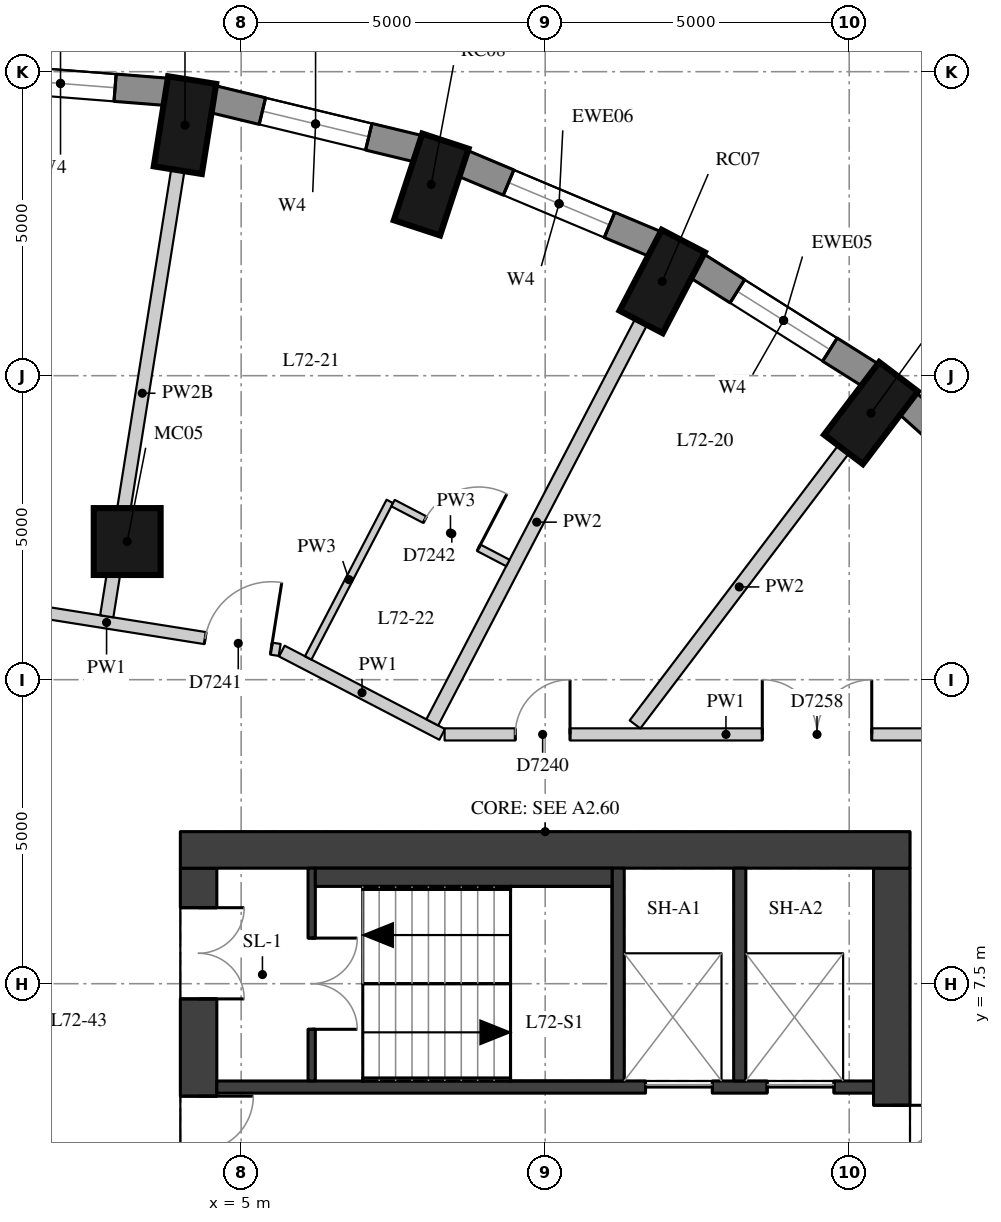
"""IFC4 building model, lengths in metres.
Left out: names, types, materials, properties, quantities, classifications, styles, units other than length and angle.
Written with IfcOpenShell. Run it as: python <this file> out.ifc"""

import sys

from ifc_helpers import new_model, si_unit, direction, frame, frame_2d, origin, origin_2d, place, context, subcontext, project, spatial, rectangle, extrude, element, fill, save


model = new_model("IFC4")
c1 = context("Model", 3, precision=1e-05, world=origin(), true_north=direction((0.0, 1.0)))
c2 = subcontext(c1, "Body", "Model", "MODEL_VIEW")
j1 = project(units=[si_unit("LENGTHUNIT", "METRE"), si_unit("PLANEANGLEUNIT", "RADIAN")], contexts=[c1])
p1 = place(None, origin())
s1 = spatial("IfcSite", under=j1, at=p1, CompositionType="ELEMENT")
p2 = place(p1, origin())
s2 = spatial("IfcBuilding", under=s1, at=p2, CompositionType="ELEMENT")
p3 = place(p2, frame((0.0, 0.0, 253.1)))
s3 = spatial("IfcBuildingStorey", under=s2, at=p3, CompositionType="ELEMENT", Elevation=253.1)
for number, where, z_axis, x_axis in (
    (1, (15.359, 16.885, 0.0), (0.0, 0.0, 1.0), (0.604, 0.797, 0.0)),
    (2, (11.925, 19.05, 0.0), (0.0, 0.0, 1.0), (0.462, 0.887, 0.0)),
    (3, (8.125, 20.644, 0.0), (0.0, 0.0, 1.0), (0.312, 0.95, 0.0)),
    (4, (4.076, 21.621, 0.0), (0.0, 0.0, 1.0), (0.157, 0.988, 0.0)),
):
    element("IfcColumn", number, at=place(p3, frame(where, z_axis=z_axis, x_axis=x_axis)), inside=s3, PredefinedType="COLUMN", context=c2, shape_type="SweptSolid", body=[
        extrude(rectangle(XDim=1.5, YDim=0.8, at=origin_2d()), origin(), (0.0, 0.0, 1.0), 3.3),
    ])
p4 = place(p3, frame((3.126, 14.772, 0.0), z_axis=(0.0, 0.0, 1.0), x_axis=(1.0, 0.0, 0.0)))
e5 = element("IfcColumn", 5, at=p4, inside=s3, PredefinedType="COLUMN", context=c2, shape_type="SweptSolid", body=[
    extrude(rectangle(XDim=1.1, YDim=1.1, at=origin_2d()), origin(), (0.0, 0.0, 1.0), 3.3),
])
p5 = place(p3, frame((18.424, 14.828, 0.0), z_axis=(0.0, 0.0, 1.0), x_axis=(-0.743166014219, 0.669107073128, 0.0)))
e6 = element("IfcWall", 6, at=p5, inside=s3, PredefinedType="SOLIDWALL", context=c2, shape_type="SweptSolid", body=[
    extrude(rectangle(XDim=3.316, YDim=0.45, at=frame_2d((1.658, 0.0))), origin(), (0.0, 0.0, 1.0), 3.02),
])
p6 = place(p3, frame((15.353, 17.506, 0.0), z_axis=(0.0, 0.0, 1.0), x_axis=(-0.845929139811, 0.53329531258, 0.0)))
e7 = element("IfcWall", 7, at=p6, inside=s3, PredefinedType="SOLIDWALL", context=c2, shape_type="SweptSolid", body=[
    extrude(rectangle(XDim=3.385, YDim=0.45, at=frame_2d((1.692, 0.0))), origin(), (0.0, 0.0, 1.0), 3.02),
])
p7 = place(p6, frame((0.792, 0.0, 0.4)))
e8 = element("IfcOpeningElement", 8, at=p7, cuts=e7, PredefinedType="OPENING", context=c2, shape_type="SweptSolid", body=[
    extrude(rectangle(XDim=1.8, YDim=1.75, at=frame_2d((0.9, 0.875))), frame((0.0, 0.235, 0.0), z_axis=(0.0, -1.0, 0.0), x_axis=(1.0, 0.0, 0.0)), (0.0, 0.0, 1.0), 0.47),
])
p8 = place(p3, frame((11.816, 19.662, 0.0), z_axis=(0.0, 0.0, 1.0), x_axis=(-0.922024627475, 0.387131226239, 0.0)))
e9 = element("IfcWall", 9, at=p8, inside=s3, PredefinedType="SOLIDWALL", context=c2, shape_type="SweptSolid", body=[
    extrude(rectangle(XDim=3.443, YDim=0.45, at=frame_2d((1.722, 0.0))), origin(), (0.0, 0.0, 1.0), 3.02),
])
p9 = place(p8, frame((0.822, 0.0, 0.4)))
e10 = element("IfcOpeningElement", 10, at=p9, cuts=e9, PredefinedType="OPENING", context=c2, shape_type="SweptSolid", body=[
    extrude(rectangle(XDim=1.8, YDim=1.75, at=frame_2d((0.9, 0.875))), frame((0.0, 0.235, 0.0), z_axis=(0.0, -1.0, 0.0), x_axis=(1.0, 0.0, 0.0)), (0.0, 0.0, 1.0), 0.47),
])
p10 = place(p3, frame((7.919, 21.232, 0.0), z_axis=(0.0, 0.0, 1.0), x_axis=(-0.972099278496, 0.23456980357, 0.0)))
e11 = element("IfcWall", 11, at=p10, inside=s3, PredefinedType="SOLIDWALL", context=c2, shape_type="SweptSolid", body=[
    extrude(rectangle(XDim=3.487, YDim=0.45, at=frame_2d((1.743, 0.0))), origin(), (0.0, 0.0, 1.0), 3.02),
])
p11 = place(p10, frame((0.843, 0.0, 0.4)))
e12 = element("IfcOpeningElement", 12, at=p11, cuts=e11, PredefinedType="OPENING", context=c2, shape_type="SweptSolid", body=[
    extrude(rectangle(XDim=1.8, YDim=1.75, at=frame_2d((0.9, 0.875))), frame((0.0, 0.235, 0.0), z_axis=(0.0, -1.0, 0.0), x_axis=(1.0, 0.0, 0.0)), (0.0, 0.0, 1.0), 0.47),
])
p12 = place(p3, frame((3.779, 22.169, 0.0), z_axis=(0.0, 0.0, 1.0), x_axis=(-0.996910775835, 0.078542377245, 0.0)))
e13 = element("IfcWall", 13, at=p12, inside=s3, PredefinedType="SOLIDWALL", context=c2, shape_type="SweptSolid", body=[
    extrude(rectangle(XDim=3.509, YDim=0.45, at=frame_2d((1.755, 0.0))), origin(), (0.0, 0.0, 1.0), 3.02),
])
p13 = place(p12, frame((0.855, 0.0, 0.4)))
e14 = element("IfcOpeningElement", 14, at=p13, cuts=e13, PredefinedType="OPENING", context=c2, shape_type="SweptSolid", body=[
    extrude(rectangle(XDim=1.8, YDim=1.75, at=frame_2d((0.9, 0.875))), frame((0.0, 0.235, 0.0), z_axis=(0.0, -1.0, 0.0), x_axis=(1.0, 0.0, 0.0)), (0.0, 0.0, 1.0), 0.47),
])
p14 = place(p3, frame((4.3, -9.4, 0.0), z_axis=(0.0, 0.0, 1.0), x_axis=(0.0, 1.0, 0.0)))
e15 = element("IfcWall", 15, at=p14, inside=s3, PredefinedType="SHEAR", context=c2, shape_type="SweptSolid", body=[
    extrude(rectangle(XDim=18.8, YDim=0.6, at=frame_2d((9.4, 0.0))), origin(), (0.0, 0.0, 1.0), 3.02),
])
p15 = place(p14, frame((0.65, 0.0, 0.0)))
e16 = element("IfcOpeningElement", 16, at=p15, cuts=e15, PredefinedType="OPENING", context=c2, shape_type="SweptSolid", body=[
    extrude(rectangle(XDim=1.5, YDim=2.1, at=frame_2d((0.75, 1.05))), frame((0.0, 0.31, 0.0), z_axis=(0.0, -1.0, 0.0), x_axis=(1.0, 0.0, 0.0)), (0.0, 0.0, 1.0), 0.62),
])
p16 = place(p14, frame((3.75, 0.0, 0.0)))
e17 = element("IfcOpeningElement", 17, at=p16, cuts=e15, PredefinedType="OPENING", context=c2, shape_type="SweptSolid", body=[
    extrude(rectangle(XDim=1.8, YDim=2.1, at=frame_2d((0.9, 1.05))), frame((0.0, 0.31, 0.0), z_axis=(0.0, -1.0, 0.0), x_axis=(1.0, 0.0, 0.0)), (0.0, 0.0, 1.0), 0.62),
])
p17 = place(p14, frame((6.25, 0.0, 0.0)))
e18 = element("IfcOpeningElement", 18, at=p17, cuts=e15, PredefinedType="OPENING", context=c2, shape_type="SweptSolid", body=[
    extrude(rectangle(XDim=1.1, YDim=2.1, at=frame_2d((0.55, 1.05))), frame((0.0, 0.31, 0.0), z_axis=(0.0, -1.0, 0.0), x_axis=(1.0, 0.0, 0.0)), (0.0, 0.0, 1.0), 0.62),
])
p18 = place(p14, frame((8.9, 0.0, 0.0)))
e19 = element("IfcOpeningElement", 19, at=p18, cuts=e15, PredefinedType="OPENING", context=c2, shape_type="SweptSolid", body=[
    extrude(rectangle(XDim=1.0, YDim=2.1, at=frame_2d((0.5, 1.05))), frame((0.0, 0.31, 0.0), z_axis=(0.0, -1.0, 0.0), x_axis=(1.0, 0.0, 0.0)), (0.0, 0.0, 1.0), 0.62),
])
p19 = place(p14, frame((11.45, 0.0, 0.0)))
e20 = element("IfcOpeningElement", 20, at=p19, cuts=e15, PredefinedType="OPENING", context=c2, shape_type="SweptSolid", body=[
    extrude(rectangle(XDim=1.1, YDim=2.1, at=frame_2d((0.55, 1.05))), frame((0.0, 0.31, 0.0), z_axis=(0.0, -1.0, 0.0), x_axis=(1.0, 0.0, 0.0)), (0.0, 0.0, 1.0), 0.62),
])
p20 = place(p14, frame((13.25, 0.0, 0.0)))
e21 = element("IfcOpeningElement", 21, at=p20, cuts=e15, PredefinedType="OPENING", context=c2, shape_type="SweptSolid", body=[
    extrude(rectangle(XDim=1.8, YDim=2.1, at=frame_2d((0.9, 1.05))), frame((0.0, 0.31, 0.0), z_axis=(0.0, -1.0, 0.0), x_axis=(1.0, 0.0, 0.0)), (0.0, 0.0, 1.0), 0.62),
])
p21 = place(p14, frame((16.65, 0.0, 0.0)))
e22 = element("IfcOpeningElement", 22, at=p21, cuts=e15, PredefinedType="OPENING", context=c2, shape_type="SweptSolid", body=[
    extrude(rectangle(XDim=1.5, YDim=2.1, at=frame_2d((0.75, 1.05))), frame((0.0, 0.31, 0.0), z_axis=(0.0, -1.0, 0.0), x_axis=(1.0, 0.0, 0.0)), (0.0, 0.0, 1.0), 0.62),
])
p22 = place(p3, frame((15.7, -9.4, 0.0), z_axis=(0.0, 0.0, 1.0), x_axis=(0.0, 1.0, 0.0)))
e23 = element("IfcWall", 23, at=p22, inside=s3, PredefinedType="SHEAR", context=c2, shape_type="SweptSolid", body=[
    extrude(rectangle(XDim=18.8, YDim=0.6, at=frame_2d((9.4, 0.0))), origin(), (0.0, 0.0, 1.0), 3.02),
])
p23 = place(p22, frame((13.4, 0.0, 0.0)))
e24 = element("IfcOpeningElement", 24, at=p23, cuts=e23, PredefinedType="OPENING", context=c2, shape_type="SweptSolid", body=[
    extrude(rectangle(XDim=1.5, YDim=2.1, at=frame_2d((0.75, 1.05))), frame((0.0, 0.31, 0.0), z_axis=(0.0, -1.0, 0.0), x_axis=(1.0, 0.0, 0.0)), (0.0, 0.0, 1.0), 0.62),
])
p24 = place(p22, frame((3.9, 0.0, 0.0)))
e25 = element("IfcOpeningElement", 25, at=p24, cuts=e23, PredefinedType="OPENING", context=c2, shape_type="SweptSolid", body=[
    extrude(rectangle(XDim=1.5, YDim=2.1, at=frame_2d((0.75, 1.05))), frame((0.0, 0.31, 0.0), z_axis=(0.0, -1.0, 0.0), x_axis=(1.0, 0.0, 0.0)), (0.0, 0.0, 1.0), 0.62),
])
p25 = place(p3, frame((4.0, 9.7, 0.0), z_axis=(0.0, 0.0, 1.0), x_axis=(1.0, 0.0, 0.0)))
e26 = element("IfcWall", 26, at=p25, inside=s3, PredefinedType="SHEAR", context=c2, shape_type="SweptSolid", body=[
    extrude(rectangle(XDim=12.0, YDim=0.6, at=frame_2d((6.0, 0.0))), origin(), (0.0, 0.0, 1.0), 3.02),
])
p26 = place(p3, frame((4.6, 5.8, 0.0), z_axis=(0.0, 0.0, 1.0), x_axis=(1.0, 0.0, 0.0)))
e27 = element("IfcWall", 27, at=p26, inside=s3, PredefinedType="SHEAR", context=c2, shape_type="SweptSolid", body=[
    extrude(rectangle(XDim=10.8, YDim=0.2, at=frame_2d((5.4, 0.0))), origin(), (0.0, 0.0, 1.0), 3.02),
])
p27 = place(p26, frame((7.05, 0.0, 0.0)))
e28 = element("IfcOpeningElement", 28, at=p27, cuts=e27, PredefinedType="OPENING", context=c2, shape_type="SweptSolid", body=[
    extrude(rectangle(XDim=1.1, YDim=2.1, at=frame_2d((0.55, 1.05))), frame((0.0, 0.11, 0.0), z_axis=(0.0, -1.0, 0.0), x_axis=(1.0, 0.0, 0.0)), (0.0, 0.0, 1.0), 0.22),
])
p28 = place(p26, frame((9.05, 0.0, 0.0)))
e29 = element("IfcOpeningElement", 29, at=p28, cuts=e27, PredefinedType="OPENING", context=c2, shape_type="SweptSolid", body=[
    extrude(rectangle(XDim=1.1, YDim=2.1, at=frame_2d((0.55, 1.05))), frame((0.0, 0.11, 0.0), z_axis=(0.0, -1.0, 0.0), x_axis=(1.0, 0.0, 0.0)), (0.0, 0.0, 1.0), 0.22),
])
for number, where, z_axis, x_axis in (
    (30, (11.2, 5.9, 0.0), (0.0, 0.0, 1.0), (0.0, 1.0, 0.0)),
    (31, (13.2, 5.9, 0.0), (0.0, 0.0, 1.0), (0.0, 1.0, 0.0)),
):
    element("IfcWall", number, at=place(p3, frame(where, z_axis=z_axis, x_axis=x_axis)), inside=s3, PredefinedType="SHEAR", context=c2, shape_type="SweptSolid", body=[
        extrude(rectangle(XDim=3.5, YDim=0.2, at=frame_2d((1.75, 0.0))), origin(), (0.0, 0.0, 1.0), 3.02),
    ])
p29 = place(p3, frame((6.16, 5.9, 0.0), z_axis=(0.0, 0.0, 1.0), x_axis=(0.0, 1.0, 0.0)))
e32 = element("IfcWall", 32, at=p29, inside=s3, PredefinedType="SHEAR", context=c2, shape_type="SweptSolid", body=[
    extrude(rectangle(XDim=3.5, YDim=0.12, at=frame_2d((1.75, 0.0))), origin(), (0.0, 0.0, 1.0), 3.02),
])
p30 = place(p29, frame((0.85, 0.0, 0.0)))
e33 = element("IfcOpeningElement", 33, at=p30, cuts=e32, PredefinedType="OPENING", context=c2, shape_type="SweptSolid", body=[
    extrude(rectangle(XDim=1.5, YDim=2.1, at=frame_2d((0.75, 1.05))), frame((0.0, 0.07, 0.0), z_axis=(0.0, -1.0, 0.0), x_axis=(1.0, 0.0, 0.0)), (0.0, 0.0, 1.0), 0.14),
])
p31 = place(p3, frame((6.22, 9.25, 0.0), z_axis=(0.0, 0.0, 1.0), x_axis=(1.0, 0.0, 0.0)))
e34 = element("IfcWall", 34, at=p31, inside=s3, PredefinedType="PARTITIONING", context=c2, shape_type="SweptSolid", body=[
    extrude(rectangle(XDim=4.88, YDim=0.3, at=frame_2d((2.44, 0.0))), origin(), (0.0, 0.0, 1.0), 3.02),
])
p32 = place(p3, frame((-0.061, 13.894, 0.0), z_axis=(0.0, 0.0, 1.0), x_axis=(0.987623870558, -0.156840971383, 0.0)))
e35 = element("IfcWall", 35, at=p32, inside=s3, PredefinedType="PARTITIONING", context=c2, shape_type="SweptSolid", body=[
    extrude(rectangle(XDim=5.766, YDim=0.2, at=frame_2d((2.883, 0.0))), origin(), (0.0, 0.0, 1.0), 3.02),
])
p33 = place(p32, frame((4.526, 0.0, 0.0)))
e36 = element("IfcOpeningElement", 36, at=p33, cuts=e35, PredefinedType="OPENING", context=c2, shape_type="SweptSolid", body=[
    extrude(rectangle(XDim=1.1, YDim=2.1, at=frame_2d((0.55, 1.05))), frame((0.0, 0.11, 0.0), z_axis=(0.0, -1.0, 0.0), x_axis=(1.0, 0.0, 0.0)), (0.0, 0.0, 1.0), 0.22),
])
p34 = place(p3, frame((5.669, 12.971, 0.0), z_axis=(0.0, 0.0, 1.0), x_axis=(0.887284047921, -0.461223393058, 0.0)))
e37 = element("IfcWall", 37, at=p34, inside=s3, PredefinedType="PARTITIONING", context=c2, shape_type="SweptSolid", body=[
    extrude(rectangle(XDim=2.972, YDim=0.2, at=frame_2d((1.486, 0.0))), origin(), (0.0, 0.0, 1.0), 3.02),
])
p35 = place(p3, frame((8.346, 11.6, 0.0), z_axis=(0.0, 0.0, 1.0), x_axis=(1.0, 0.0, 0.0)))
e38 = element("IfcWall", 38, at=p35, inside=s3, PredefinedType="PARTITIONING", context=c2, shape_type="SweptSolid", body=[
    extrude(rectangle(XDim=9.254, YDim=0.2, at=frame_2d((4.627, 0.0))), origin(), (0.0, 0.0, 1.0), 3.02),
])
p36 = place(p35, frame((1.162, 0.0, 0.0)))
e39 = element("IfcOpeningElement", 39, at=p36, cuts=e38, PredefinedType="OPENING", context=c2, shape_type="SweptSolid", body=[
    extrude(rectangle(XDim=0.9, YDim=2.1, at=frame_2d((0.45, 1.05))), frame((0.0, 0.11, 0.0), z_axis=(0.0, -1.0, 0.0), x_axis=(1.0, 0.0, 0.0)), (0.0, 0.0, 1.0), 0.22),
])
p37 = place(p35, frame((5.224, 0.0, 0.0)))
e40 = element("IfcOpeningElement", 40, at=p37, cuts=e38, PredefinedType="OPENING", context=c2, shape_type="SweptSolid", body=[
    extrude(rectangle(XDim=1.8, YDim=2.1, at=frame_2d((0.9, 1.05))), frame((0.0, 0.11, 0.0), z_axis=(0.0, -1.0, 0.0), x_axis=(1.0, 0.0, 0.0)), (0.0, 0.0, 1.0), 0.22),
])
p38 = place(p3, frame((14.906, 16.287, 0.0), z_axis=(0.0, 0.0, 1.0), x_axis=(-0.604066355306, -0.796934023861, 0.0)))
e41 = element("IfcWall", 41, at=p38, inside=s3, PredefinedType="PARTITIONING", context=c2, shape_type="SweptSolid", body=[
    extrude(rectangle(XDim=5.676, YDim=0.22, at=frame_2d((2.838, 0.0))), origin(), (0.0, 0.0, 1.0), 3.02),
])
p39 = place(p3, frame((11.578, 18.385, 0.0), z_axis=(0.0, 0.0, 1.0), x_axis=(-0.462371689287, -0.886686202073, 0.0)))
e42 = element("IfcWall", 42, at=p39, inside=s3, PredefinedType="PARTITIONING", context=c2, shape_type="SweptSolid", body=[
    extrude(rectangle(XDim=7.429, YDim=0.22, at=frame_2d((3.714, 0.0))), origin(), (0.0, 0.0, 1.0), 3.02),
])
p40 = place(p3, frame((3.958, 20.88, 0.0), z_axis=(0.0, 0.0, 1.0), x_axis=(-0.157281826031, -0.987553759144, 0.0)))
e43 = element("IfcWall", 43, at=p40, inside=s3, PredefinedType="PARTITIONING", context=c2, shape_type="SweptSolid", body=[
    extrude(rectangle(XDim=7.431, YDim=0.22, at=frame_2d((3.715, 0.0))), origin(), (0.0, 0.0, 1.0), 2.57),
])
p41 = place(p3, frame((6.103, 12.858, 0.0), z_axis=(0.0, 0.0, 1.0), x_axis=(0.462353319711, 0.886695780836, 0.0)))
e44 = element("IfcWall", 44, at=p41, inside=s3, PredefinedType="PARTITIONING", context=c2, shape_type="SweptSolid", body=[
    extrude(rectangle(XDim=2.903, YDim=0.12, at=frame_2d((1.452, 0.0))), origin(), (0.0, 0.0, 1.0), 3.02),
])
p42 = place(p3, frame((7.498, 15.405, 0.0), z_axis=(0.0, 0.0, 1.0), x_axis=(0.886662502683, -0.46241713456, 0.0)))
e45 = element("IfcWall", 45, at=p42, inside=s3, PredefinedType="PARTITIONING", context=c2, shape_type="SweptSolid", body=[
    extrude(rectangle(XDim=2.13, YDim=0.12, at=frame_2d((1.065, 0.0))), origin(), (0.0, 0.0, 1.0), 3.02),
])
p43 = place(p42, frame((0.59, 0.0, 0.0)))
e46 = element("IfcOpeningElement", 46, at=p43, cuts=e45, PredefinedType="OPENING", context=c2, shape_type="SweptSolid", body=[
    extrude(rectangle(XDim=1.0, YDim=2.1, at=frame_2d((0.5, 1.05))), frame((0.0, 0.07, 0.0), z_axis=(0.0, -1.0, 0.0), x_axis=(1.0, 0.0, 0.0)), (0.0, 0.0, 1.0), 0.14),
])
p44 = place(p7, origin())
e47 = element("IfcWindow", 47, at=p44, inside=s3, PartitioningType="SINGLE_PANEL", PredefinedType="WINDOW", context=c2, shape_type="SweptSolid", body=[
    extrude(rectangle(XDim=1.8, YDim=1.75, at=frame_2d((0.9, 0.875))), frame((0.0, 0.035, 0.0), z_axis=(0.0, -1.0, 0.0), x_axis=(1.0, 0.0, 0.0)), (0.0, 0.0, 1.0), 0.06),
])
fill(e8, e47)
p45 = place(p9, origin())
e48 = element("IfcWindow", 48, at=p45, inside=s3, PartitioningType="SINGLE_PANEL", PredefinedType="WINDOW", context=c2, shape_type="SweptSolid", body=[
    extrude(rectangle(XDim=1.8, YDim=1.75, at=frame_2d((0.9, 0.875))), frame((0.0, 0.035, 0.0), z_axis=(0.0, -1.0, 0.0), x_axis=(1.0, 0.0, 0.0)), (0.0, 0.0, 1.0), 0.06),
])
fill(e10, e48)
p46 = place(p11, origin())
e49 = element("IfcWindow", 49, at=p46, inside=s3, PartitioningType="SINGLE_PANEL", PredefinedType="WINDOW", context=c2, shape_type="SweptSolid", body=[
    extrude(rectangle(XDim=1.8, YDim=1.75, at=frame_2d((0.9, 0.875))), frame((0.0, 0.035, 0.0), z_axis=(0.0, -1.0, 0.0), x_axis=(1.0, 0.0, 0.0)), (0.0, 0.0, 1.0), 0.06),
])
fill(e12, e49)
p47 = place(p13, origin())
e50 = element("IfcWindow", 50, at=p47, inside=s3, PartitioningType="SINGLE_PANEL", PredefinedType="WINDOW", context=c2, shape_type="SweptSolid", body=[
    extrude(rectangle(XDim=1.8, YDim=1.75, at=frame_2d((0.9, 0.875))), frame((0.0, 0.035, 0.0), z_axis=(0.0, -1.0, 0.0), x_axis=(1.0, 0.0, 0.0)), (0.0, 0.0, 1.0), 0.06),
])
fill(e14, e50)
p48 = place(p20, origin())
e51 = element("IfcDoor", 51, at=p48, inside=s3, OperationType="DOUBLE_DOOR_SINGLE_SWING", PredefinedType="DOOR", context=c2, shape_type="SweptSolid", body=[
    extrude(rectangle(XDim=1.8, YDim=2.1, at=frame_2d((0.9, 1.05))), frame((0.0, 0.025, 0.0), z_axis=(0.0, -1.0, 0.0), x_axis=(1.0, 0.0, 0.0)), (0.0, 0.0, 1.0), 0.05),
])
fill(e21, e51)
p49 = place(p21, origin())
e52 = element("IfcDoor", 52, at=p49, inside=s3, OperationType="DOUBLE_DOOR_SINGLE_SWING", PredefinedType="DOOR", context=c2, shape_type="SweptSolid", body=[
    extrude(rectangle(XDim=1.5, YDim=2.1, at=frame_2d((0.75, 1.05))), frame((0.0, 0.025, 0.0), z_axis=(0.0, -1.0, 0.0), x_axis=(1.0, 0.0, 0.0)), (0.0, 0.0, 1.0), 0.05),
])
fill(e22, e52)
p50 = place(p23, origin())
e53 = element("IfcDoor", 53, at=p50, inside=s3, OperationType="DOUBLE_DOOR_SINGLE_SWING", PredefinedType="DOOR", context=c2, shape_type="SweptSolid", body=[
    extrude(rectangle(XDim=1.5, YDim=2.1, at=frame_2d((0.75, 1.05))), frame((0.0, 0.025, 0.0), z_axis=(0.0, -1.0, 0.0), x_axis=(1.0, 0.0, 0.0)), (0.0, 0.0, 1.0), 0.05),
])
fill(e24, e53)
p51 = place(p30, origin())
e54 = element("IfcDoor", 54, at=p51, inside=s3, OperationType="DOUBLE_DOOR_SINGLE_SWING", PredefinedType="DOOR", context=c2, shape_type="SweptSolid", body=[
    extrude(rectangle(XDim=1.5, YDim=2.1, at=frame_2d((0.75, 1.05))), frame((0.0, 0.025, 0.0), z_axis=(0.0, -1.0, 0.0), x_axis=(1.0, 0.0, 0.0)), (0.0, 0.0, 1.0), 0.05),
])
fill(e33, e54)
p52 = place(p27, origin())
e55 = element("IfcDoor", 55, at=p52, inside=s3, OperationType="DOUBLE_DOOR_SLIDING", PredefinedType="DOOR", context=c2, shape_type="SweptSolid", body=[
    extrude(rectangle(XDim=1.1, YDim=2.1, at=frame_2d((0.55, 1.05))), frame((0.0, 0.025, 0.0), z_axis=(0.0, -1.0, 0.0), x_axis=(1.0, 0.0, 0.0)), (0.0, 0.0, 1.0), 0.05),
])
fill(e28, e55)
p53 = place(p28, origin())
e56 = element("IfcDoor", 56, at=p53, inside=s3, OperationType="DOUBLE_DOOR_SLIDING", PredefinedType="DOOR", context=c2, shape_type="SweptSolid", body=[
    extrude(rectangle(XDim=1.1, YDim=2.1, at=frame_2d((0.55, 1.05))), frame((0.0, 0.025, 0.0), z_axis=(0.0, -1.0, 0.0), x_axis=(1.0, 0.0, 0.0)), (0.0, 0.0, 1.0), 0.05),
])
fill(e29, e56)
p54 = place(p36, origin())
e57 = element("IfcDoor", 57, at=p54, inside=s3, OperationType="SINGLE_SWING_RIGHT", PredefinedType="DOOR", context=c2, shape_type="SweptSolid", body=[
    extrude(rectangle(XDim=0.9, YDim=2.1, at=frame_2d((0.45, 1.05))), frame((0.0, 0.025, 0.0), z_axis=(0.0, -1.0, 0.0), x_axis=(1.0, 0.0, 0.0)), (0.0, 0.0, 1.0), 0.05),
])
fill(e39, e57)
p55 = place(p33, origin())
e58 = element("IfcDoor", 58, at=p55, inside=s3, OperationType="SINGLE_SWING_RIGHT", PredefinedType="DOOR", context=c2, shape_type="SweptSolid", body=[
    extrude(rectangle(XDim=1.1, YDim=2.1, at=frame_2d((0.55, 1.05))), frame((0.0, 0.025, 0.0), z_axis=(0.0, -1.0, 0.0), x_axis=(1.0, 0.0, 0.0)), (0.0, 0.0, 1.0), 0.05),
])
fill(e36, e58)
p56 = place(p43, origin())
e59 = element("IfcDoor", 59, at=p56, inside=s3, OperationType="SINGLE_SWING_RIGHT", PredefinedType="DOOR", context=c2, shape_type="SweptSolid", body=[
    extrude(rectangle(XDim=1.0, YDim=2.1, at=frame_2d((0.5, 1.05))), frame((0.0, 0.025, 0.0), z_axis=(0.0, -1.0, 0.0), x_axis=(1.0, 0.0, 0.0)), (0.0, 0.0, 1.0), 0.05),
])
fill(e46, e59)
p57 = place(p37, origin())
e60 = element("IfcDoor", 60, at=p57, inside=s3, OperationType="DOUBLE_DOOR_SINGLE_SWING", PredefinedType="DOOR", context=c2, shape_type="SweptSolid", body=[
    extrude(rectangle(XDim=1.8, YDim=2.1, at=frame_2d((0.9, 1.05))), frame((0.0, 0.025, 0.0), z_axis=(0.0, -1.0, 0.0), x_axis=(1.0, 0.0, 0.0)), (0.0, 0.0, 1.0), 0.05),
])
fill(e40, e60)
save(model, sys.argv[1])
